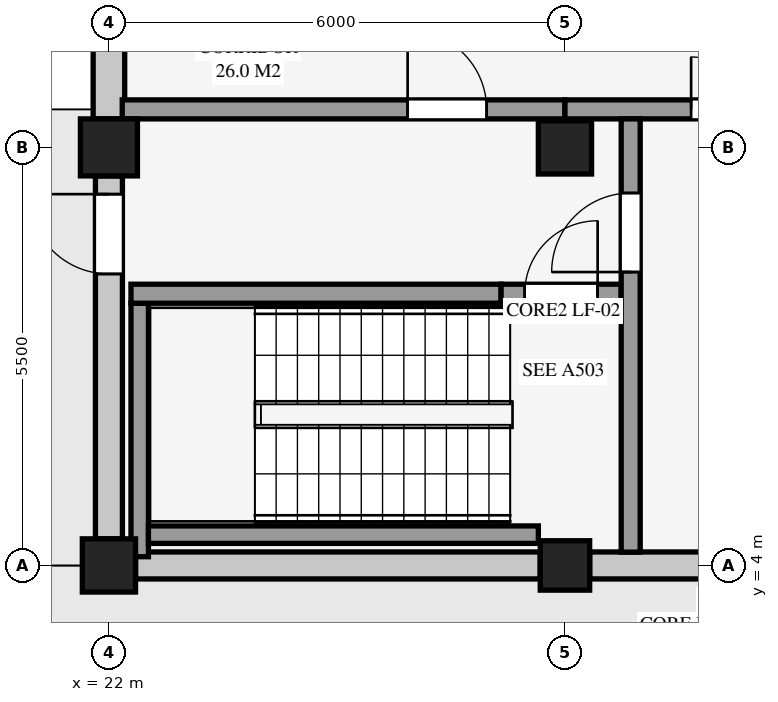
"""IFC4 building model, lengths in metres.
Left out: names, types, materials, properties, quantities, classifications, styles, units other than length and angle.
Written with IfcOpenShell. Run it as: python <this file> out.ifc"""

import sys

from ifc_helpers import new_model, si_unit, direction, frame, frame_2d, origin, origin_2d, place, context, subcontext, project, spatial, rectangle, extrude, element, fill, save


model = new_model("IFC4")
c1 = context("Model", 3, precision=1e-05, world=origin(), true_north=direction((0.0, 1.0)))
c2 = subcontext(c1, "Body", "Model", "MODEL_VIEW")
j1 = project(units=[si_unit("LENGTHUNIT", "METRE"), si_unit("PLANEANGLEUNIT", "RADIAN")], contexts=[c1])
p1 = place(None, origin())
s1 = spatial("IfcSite", under=j1, at=p1, CompositionType="ELEMENT")
p2 = place(p1, origin())
s2 = spatial("IfcBuilding", under=s1, at=p2, CompositionType="ELEMENT")
p3 = place(p2, origin())
s3 = spatial("IfcBuildingStorey", under=s2, at=p3, CompositionType="ELEMENT", Elevation=0.0)
p4 = place(p3, frame((22.0, 4.0, 0.0), z_axis=(0.0, 0.0, 1.0), x_axis=(1.0, 0.0, 0.0)))
e1 = element("IfcColumn", 1, at=p4, inside=s3, PredefinedType="COLUMN", context=c2, shape_type="SweptSolid", body=[
    extrude(rectangle(XDim=0.7, YDim=0.7, at=origin_2d()), origin(), (0.0, 0.0, 1.0), 4.5),
])
p5 = place(p3, frame((22.0, 9.5, 0.0), z_axis=(0.0, 0.0, 1.0), x_axis=(1.0, 0.0, 0.0)))
e2 = element("IfcColumn", 2, at=p5, inside=s3, PredefinedType="COLUMN", context=c2, shape_type="SweptSolid", body=[
    extrude(rectangle(XDim=0.75, YDim=0.75, at=origin_2d()), origin(), (0.0, 0.0, 1.0), 4.5),
])
p6 = place(p3, frame((28.0, 4.0, 0.0), z_axis=(0.0, 0.0, 1.0), x_axis=(1.0, 0.0, 0.0)))
e3 = element("IfcColumn", 3, at=p6, inside=s3, PredefinedType="COLUMN", context=c2, shape_type="SweptSolid", body=[
    extrude(rectangle(XDim=0.65, YDim=0.65, at=origin_2d()), origin(), (0.0, 0.0, 1.0), 4.5),
])
p7 = place(p3, frame((28.0, 9.5, 0.0), z_axis=(0.0, 0.0, 1.0), x_axis=(1.0, 0.0, 0.0)))
e4 = element("IfcColumn", 4, at=p7, inside=s3, PredefinedType="COLUMN", context=c2, shape_type="SweptSolid", body=[
    extrude(rectangle(XDim=0.7, YDim=0.7, at=origin_2d()), origin(), (0.0, 0.0, 1.0), 4.5),
])
for number, where, z_axis, x_axis in (
    (5, (27.675, 4.0, 0.0), (0.0, 0.0, 1.0), (-1.0, 0.0, 0.0)),
    (6, (33.65, 4.0, 0.0), (0.0, 0.0, 1.0), (-1.0, 0.0, 0.0)),
):
    element("IfcWall", number, at=place(p3, frame(where, z_axis=z_axis, x_axis=x_axis)), inside=s3, PredefinedType="SOLIDWALL", context=c2, shape_type="SweptSolid", body=[
        extrude(rectangle(XDim=5.325, YDim=0.355, at=frame_2d((2.663, 0.0))), origin(), (0.0, 0.0, 1.0), 3.881),
    ])
p8 = place(p3, frame((22.0, 4.35, 0.0), z_axis=(0.0, 0.0, 1.0), x_axis=(0.0, 1.0, 0.0)))
e7 = element("IfcWall", 7, at=p8, inside=s3, PredefinedType="SOLIDWALL", context=c2, shape_type="SweptSolid", body=[
    extrude(rectangle(XDim=4.775, YDim=0.355, at=frame_2d((2.387, 0.0))), origin(), (0.0, 0.0, 1.0), 3.881),
])
p9 = place(p8, frame((3.485, 0.0, 0.0)))
e8 = element("IfcOpeningElement", 8, at=p9, cuts=e7, PredefinedType="OPENING", context=c2, shape_type="SweptSolid", body=[
    extrude(rectangle(XDim=1.05, YDim=2.14, at=frame_2d((0.525, 1.07))), frame((0.0, 0.188, 0.0), z_axis=(0.0, -1.0, 0.0), x_axis=(1.0, 0.0, 0.0)), (0.0, 0.0, 1.0), 0.375),
])
p10 = place(p3, frame((22.0, 9.875, 0.0), z_axis=(0.0, 0.0, 1.0), x_axis=(0.0, 1.0, 0.0)))
e9 = element("IfcWall", 9, at=p10, inside=s3, PredefinedType="SOLIDWALL", context=c2, shape_type="SweptSolid", body=[
    extrude(rectangle(XDim=4.725, YDim=0.415, at=frame_2d((2.363, 0.0))), origin(), (0.0, 0.0, 1.0), 3.809),
])
p11 = place(p10, frame((1.887, 0.0, 0.9)))
e10 = element("IfcOpeningElement", 10, at=p11, cuts=e9, PredefinedType="OPENING", context=c2, shape_type="SweptSolid", body=[
    extrude(rectangle(XDim=0.95, YDim=1.95, at=frame_2d((0.475, 0.975))), frame((0.0, 0.218, 0.0), z_axis=(0.0, -1.0, 0.0), x_axis=(1.0, 0.0, 0.0)), (0.0, 0.0, 1.0), 0.435),
])
p12 = place(p3, frame((22.175, 10.0, 0.0), z_axis=(0.0, 0.0, 1.0), x_axis=(1.0, 0.0, 0.0)))
e11 = element("IfcWall", 11, at=p12, inside=s3, PredefinedType="SHEAR", context=c2, shape_type="SweptSolid", body=[
    extrude(rectangle(XDim=5.825, YDim=0.25, at=frame_2d((2.913, 0.0))), origin(), (0.0, 0.0, 1.0), 4.288),
])
p13 = place(p12, frame((3.755, 0.0, 0.0)))
e12 = element("IfcOpeningElement", 12, at=p13, cuts=e11, PredefinedType="OPENING", context=c2, shape_type="SweptSolid", body=[
    extrude(rectangle(XDim=1.04, YDim=2.14, at=frame_2d((0.52, 1.07))), frame((0.0, 0.135, 0.0), z_axis=(0.0, -1.0, 0.0), x_axis=(1.0, 0.0, 0.0)), (0.0, 0.0, 1.0), 0.27),
])
p14 = place(p3, frame((28.0, 10.0, 0.0), z_axis=(0.0, 0.0, 1.0), x_axis=(1.0, 0.0, 0.0)))
e13 = element("IfcWall", 13, at=p14, inside=s3, PredefinedType="SHEAR", context=c2, shape_type="SweptSolid", body=[
    extrude(rectangle(XDim=6.125, YDim=0.25, at=frame_2d((3.062, 0.0))), origin(), (0.0, 0.0, 1.0), 4.288),
])
p15 = place(p14, frame((1.66, 0.0, 0.0)))
e14 = element("IfcOpeningElement", 14, at=p15, cuts=e13, PredefinedType="OPENING", context=c2, shape_type="SweptSolid", body=[
    extrude(rectangle(XDim=1.38, YDim=2.16, at=frame_2d((0.69, 1.08))), frame((0.0, 0.135, 0.0), z_axis=(0.0, -1.0, 0.0), x_axis=(1.0, 0.0, 0.0)), (0.0, 0.0, 1.0), 0.27),
])
p16 = place(p3, frame((22.405, 4.115, 0.0), z_axis=(0.0, 0.0, 1.0), x_axis=(0.0, 1.0, 0.0)))
e15 = element("IfcWall", 15, at=p16, inside=s3, PredefinedType="SHEAR", context=c2, shape_type="SweptSolid", body=[
    extrude(rectangle(XDim=3.335, YDim=0.23, at=frame_2d((1.667, 0.0))), origin(), (0.0, 0.0, 1.0), 4.5),
])
p17 = place(p3, frame((22.52, 4.405, 0.0), z_axis=(0.0, 0.0, 1.0), x_axis=(1.0, 0.0, 0.0)))
e16 = element("IfcWall", 16, at=p17, inside=s3, PredefinedType="SHEAR", context=c2, shape_type="SweptSolid", body=[
    extrude(rectangle(XDim=5.13, YDim=0.23, at=frame_2d((2.565, 0.0))), origin(), (0.0, 0.0, 1.0), 4.5),
])
p18 = place(p3, frame((22.29, 7.575, 0.0), z_axis=(0.0, 0.0, 1.0), x_axis=(1.0, 0.0, 0.0)))
e17 = element("IfcWall", 17, at=p18, inside=s3, PredefinedType="SHEAR", context=c2, shape_type="SweptSolid", body=[
    extrude(rectangle(XDim=4.87, YDim=0.25, at=frame_2d((2.435, 0.0))), origin(), (0.0, 0.0, 1.0), 4.5),
])
p19 = place(p3, frame((27.16, 7.575, 0.0), z_axis=(0.0, 0.0, 1.0), x_axis=(1.0, 0.0, 0.0)))
e18 = element("IfcWall", 18, at=p19, inside=s3, PredefinedType="SHEAR", context=c2, shape_type="SweptSolid", body=[
    extrude(rectangle(XDim=1.58, YDim=0.25, at=frame_2d((0.79, 0.0))), origin(), (0.0, 0.0, 1.0), 4.288),
])
p20 = place(p19, frame((0.31, 0.0, 0.0)))
e19 = element("IfcOpeningElement", 19, at=p20, cuts=e18, PredefinedType="OPENING", context=c2, shape_type="SweptSolid", body=[
    extrude(rectangle(XDim=0.96, YDim=2.12, at=frame_2d((0.48, 1.06))), frame((0.0, 0.135, 0.0), z_axis=(0.0, -1.0, 0.0), x_axis=(1.0, 0.0, 0.0)), (0.0, 0.0, 1.0), 0.27),
])
p21 = place(p3, frame((28.865, 4.175, 0.0), z_axis=(0.0, 0.0, 1.0), x_axis=(0.0, 1.0, 0.0)))
e20 = element("IfcWall", 20, at=p21, inside=s3, PredefinedType="SHEAR", context=c2, shape_type="SweptSolid", body=[
    extrude(rectangle(XDim=5.7, YDim=0.25, at=frame_2d((2.85, 0.0))), origin(), (0.0, 0.0, 1.0), 4.288),
])
p22 = place(p21, frame((3.685, 0.0, 0.0)))
e21 = element("IfcOpeningElement", 21, at=p22, cuts=e20, PredefinedType="OPENING", context=c2, shape_type="SweptSolid", body=[
    extrude(rectangle(XDim=1.04, YDim=2.14, at=frame_2d((0.52, 1.07))), frame((0.0, 0.135, 0.0), z_axis=(0.0, -1.0, 0.0), x_axis=(1.0, 0.0, 0.0)), (0.0, 0.0, 1.0), 0.27),
])
p23 = place(p9, origin())
e22 = element("IfcDoor", 22, at=p23, inside=s3, OperationType="SINGLE_SWING_RIGHT", PredefinedType="DOOR", context=c2, shape_type="SweptSolid", body=[
    extrude(rectangle(XDim=1.05, YDim=2.14, at=frame_2d((0.525, 1.07))), frame((0.0, 0.025, 0.0), z_axis=(0.0, -1.0, 0.0), x_axis=(1.0, 0.0, 0.0)), (0.0, 0.0, 1.0), 0.05),
])
fill(e8, e22)
p24 = place(p13, origin())
e23 = element("IfcDoor", 23, at=p24, inside=s3, OperationType="SINGLE_SWING_LEFT", PredefinedType="DOOR", context=c2, shape_type="SweptSolid", body=[
    extrude(rectangle(XDim=1.04, YDim=2.14, at=frame_2d((0.52, 1.07))), frame((0.0, 0.025, 0.0), z_axis=(0.0, -1.0, 0.0), x_axis=(1.0, 0.0, 0.0)), (0.0, 0.0, 1.0), 0.05),
])
fill(e12, e23)
p25 = place(p15, origin())
e24 = element("IfcDoor", 24, at=p25, inside=s3, OperationType="DOUBLE_DOOR_SINGLE_SWING", PredefinedType="DOOR", context=c2, shape_type="SweptSolid", body=[
    extrude(rectangle(XDim=1.38, YDim=2.16, at=frame_2d((0.69, 1.08))), frame((0.0, 0.025, 0.0), z_axis=(0.0, -1.0, 0.0), x_axis=(1.0, 0.0, 0.0)), (0.0, 0.0, 1.0), 0.05),
])
fill(e14, e24)
p26 = place(p20, origin())
e25 = element("IfcDoor", 25, at=p26, inside=s3, OperationType="SINGLE_SWING_RIGHT", PredefinedType="DOOR", context=c2, shape_type="SweptSolid", body=[
    extrude(rectangle(XDim=0.96, YDim=2.12, at=frame_2d((0.48, 1.06))), frame((0.0, 0.025, 0.0), z_axis=(0.0, -1.0, 0.0), x_axis=(1.0, 0.0, 0.0)), (0.0, 0.0, 1.0), 0.05),
])
fill(e19, e25)
p27 = place(p22, origin())
e26 = element("IfcDoor", 26, at=p27, inside=s3, OperationType="SINGLE_SWING_LEFT", PredefinedType="DOOR", context=c2, shape_type="SweptSolid", body=[
    extrude(rectangle(XDim=1.04, YDim=2.14, at=frame_2d((0.52, 1.07))), frame((0.0, 0.025, 0.0), z_axis=(0.0, -1.0, 0.0), x_axis=(1.0, 0.0, 0.0)), (0.0, 0.0, 1.0), 0.05),
])
fill(e21, e26)
save(model, sys.argv[1])
